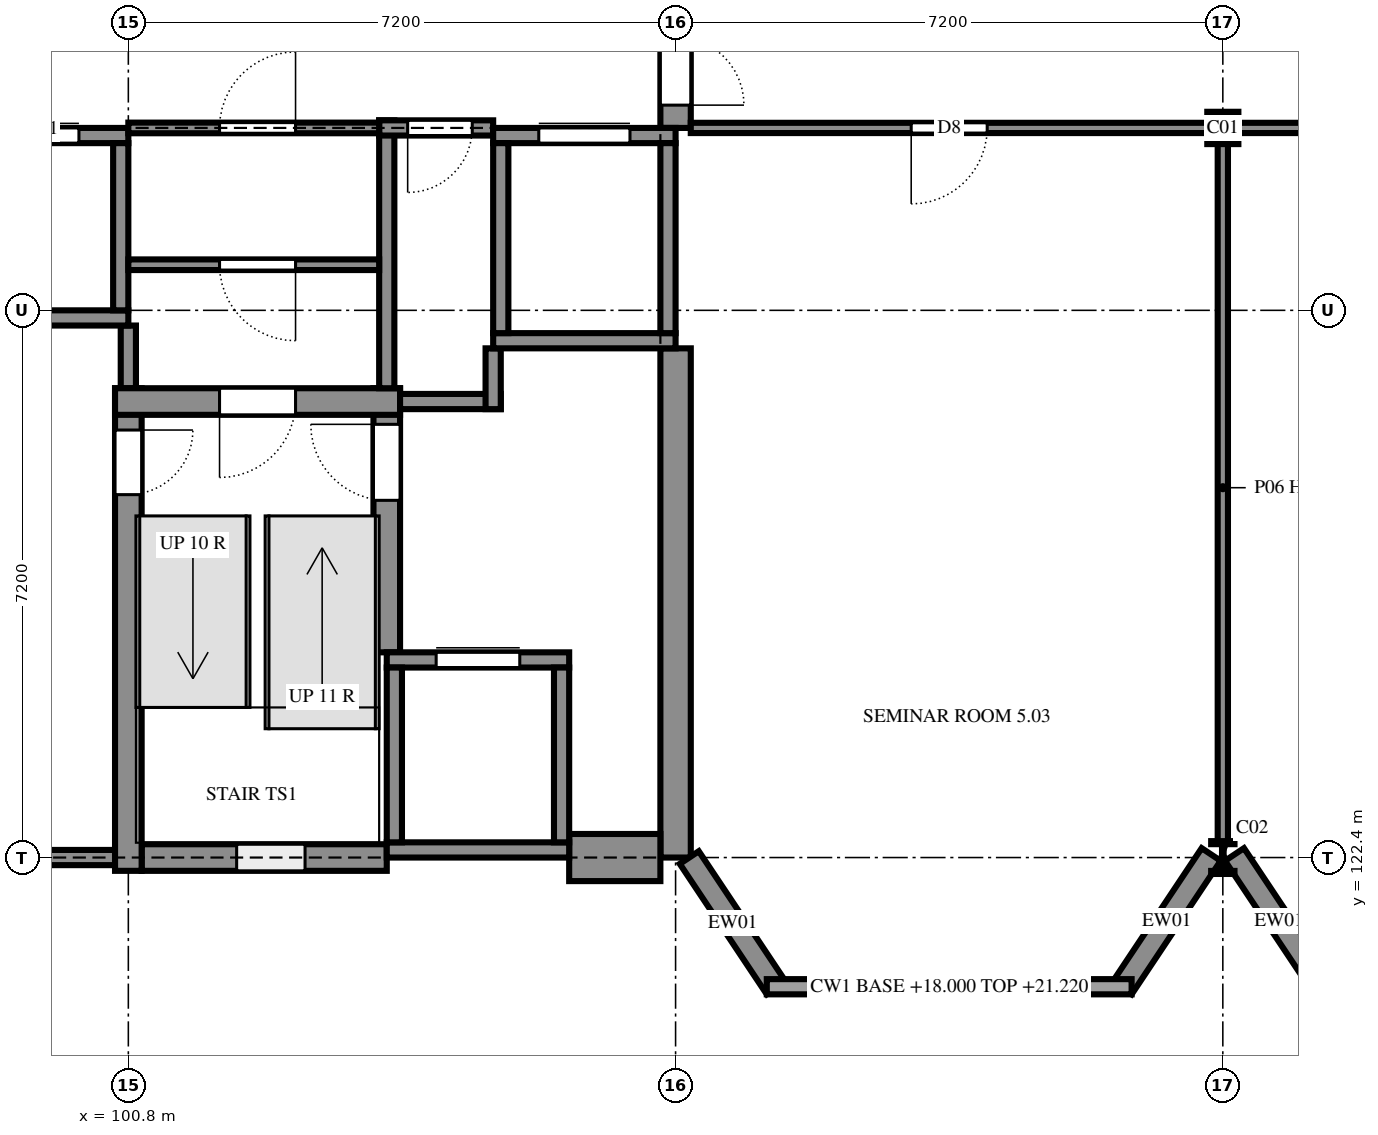
"""IFC4 building model, lengths in metres.
Left out: names, types, materials, properties, quantities, classifications, styles, units other than length and angle.
Written with IfcOpenShell. Run it as: python <this file> out.ifc"""

import sys

from ifc_helpers import new_model, si_unit, direction, frame, frame_2d, origin, origin_2d, place, context, subcontext, project, spatial, rectangle, i_section, extrude, element, fill, save


model = new_model("IFC4")
c1 = context("Model", 3, precision=1e-05, world=origin(), true_north=direction((0.0, 1.0)))
c2 = subcontext(c1, "Body", "Model", "MODEL_VIEW")
j1 = project(units=[si_unit("LENGTHUNIT", "METRE"), si_unit("PLANEANGLEUNIT", "RADIAN")], contexts=[c1])
p1 = place(None, origin())
s1 = spatial("IfcSite", under=j1, at=p1, CompositionType="ELEMENT")
p2 = place(p1, origin())
s2 = spatial("IfcBuilding", under=s1, at=p2, CompositionType="ELEMENT")
p3 = place(p2, frame((0.0, 0.0, 18.0)))
s3 = spatial("IfcBuildingStorey", under=s2, at=p3, CompositionType="ELEMENT", Elevation=18.0)
p4 = place(p3, frame((115.2, 122.4, 0.0), z_axis=(0.0, 0.0, 1.0), x_axis=(1.0, 0.0, 0.0)))
e1 = element("IfcColumn", 1, at=p4, inside=s3, PredefinedType="COLUMN", context=c2, shape_type="SweptSolid", body=[
    extrude(i_section(OverallWidth=0.307, OverallDepth=0.432, WebThickness=0.021, FlangeThickness=0.04, FilletRadius=0.027, at=origin_2d()), origin(), (0.0, 0.0, 1.0), 3.6),
])
p5 = place(p3, frame((115.2, 132.0, 0.0), z_axis=(0.0, 0.0, 1.0), x_axis=(1.0, 0.0, 0.0)))
e2 = element("IfcColumn", 2, at=p5, inside=s3, PredefinedType="COLUMN", context=c2, shape_type="SweptSolid", body=[
    extrude(i_section(OverallWidth=0.409, OverallDepth=0.425, WebThickness=0.033, FlangeThickness=0.052, FilletRadius=0.015, at=origin_2d()), origin(), (0.0, 0.0, 1.0), 3.6),
])
p6 = place(p3, frame((93.4, 122.4, 0.0), z_axis=(0.0, 0.0, 1.0), x_axis=(1.0, 0.0, 0.0)))
e3 = element("IfcWall", 3, at=p6, inside=s3, PredefinedType="SHEAR", context=c2, shape_type="SweptSolid", body=[
    extrude(rectangle(XDim=7.575, YDim=0.2, at=frame_2d((3.788, 0.0))), origin(), (0.0, 0.0, 1.0), 3.6),
])
p7 = place(p3, frame((100.975, 122.4, 0.0), z_axis=(0.0, 0.0, 1.0), x_axis=(1.0, 0.0, 0.0)))
e4 = element("IfcWall", 4, at=p7, inside=s3, PredefinedType="SHEAR", context=c2, shape_type="SweptSolid", body=[
    extrude(rectangle(XDim=3.225, YDim=0.35, at=frame_2d((1.612, 0.0))), origin(), (0.0, 0.0, 1.0), 3.6),
])
p8 = place(p7, frame((1.25, 0.0, 0.6)))
e5 = element("IfcOpeningElement", 5, at=p8, cuts=e4, PredefinedType="OPENING", context=c2, shape_type="SweptSolid", body=[
    extrude(rectangle(XDim=0.9, YDim=2.1, at=frame_2d((0.45, 1.05))), frame((0.0, 0.185, 0.0), z_axis=(0.0, -1.0, 0.0), x_axis=(1.0, 0.0, 0.0)), (0.0, 0.0, 1.0), 0.37),
])
p9 = place(p3, frame((108.0, 122.4, 0.0), z_axis=(0.0, 0.0, 1.0), x_axis=(0.0, 1.0, 0.0)))
e6 = element("IfcWall", 6, at=p9, inside=s3, PredefinedType="SHEAR", context=c2, shape_type="SweptSolid", body=[
    extrude(rectangle(XDim=6.7, YDim=0.4, at=frame_2d((3.35, 0.0))), origin(), (0.0, 0.0, 1.0), 3.6),
])
p10 = place(p3, frame((104.2, 125.1, 0.0), z_axis=(0.0, 0.0, 1.0), x_axis=(0.0, 1.0, 0.0)))
e7 = element("IfcWall", 7, at=p10, inside=s3, PredefinedType="SHEAR", context=c2, shape_type="SweptSolid", body=[
    extrude(rectangle(XDim=3.475, YDim=0.35, at=frame_2d((1.737, 0.0))), origin(), (0.0, 0.0, 1.0), 3.6),
])
p11 = place(p10, frame((2.0, 0.0, 0.0)))
e8 = element("IfcOpeningElement", 8, at=p11, cuts=e7, PredefinedType="OPENING", context=c2, shape_type="SweptSolid", body=[
    extrude(rectangle(XDim=1.0, YDim=2.1, at=frame_2d((0.5, 1.05))), frame((0.0, 0.185, 0.0), z_axis=(0.0, -1.0, 0.0), x_axis=(1.0, 0.0, 0.0)), (0.0, 0.0, 1.0), 0.37),
])
p12 = place(p3, frame((100.8, 128.575, 0.0), z_axis=(0.0, 0.0, 1.0), x_axis=(0.0, -1.0, 0.0)))
e9 = element("IfcWall", 9, at=p12, inside=s3, PredefinedType="SHEAR", context=c2, shape_type="SweptSolid", body=[
    extrude(rectangle(XDim=6.35, YDim=0.35, at=frame_2d((3.175, 0.0))), origin(), (0.0, 0.0, 1.0), 3.6),
])
p13 = place(p12, frame((0.55, 0.0, 0.0)))
e10 = element("IfcOpeningElement", 10, at=p13, cuts=e9, PredefinedType="OPENING", context=c2, shape_type="SweptSolid", body=[
    extrude(rectangle(XDim=0.85, YDim=2.1, at=frame_2d((0.425, 1.05))), frame((0.0, 0.185, 0.0), z_axis=(0.0, -1.0, 0.0), x_axis=(1.0, 0.0, 0.0)), (0.0, 0.0, 1.0), 0.37),
])
p14 = place(p3, frame((100.8, 128.575, 0.0), z_axis=(0.0, 0.0, 1.0), x_axis=(0.0, 1.0, 0.0)))
e11 = element("IfcWall", 11, at=p14, inside=s3, PredefinedType="SHEAR", context=c2, shape_type="SweptSolid", body=[
    extrude(rectangle(XDim=0.825, YDim=0.2, at=frame_2d((0.413, 0.0))), origin(), (0.0, 0.0, 1.0), 3.6),
])
p15 = place(p3, frame((104.375, 128.4, 0.0), z_axis=(0.0, 0.0, 1.0), x_axis=(-1.0, 0.0, 0.0)))
e12 = element("IfcWall", 12, at=p15, inside=s3, PredefinedType="SHEAR", context=c2, shape_type="SweptSolid", body=[
    extrude(rectangle(XDim=3.75, YDim=0.35, at=frame_2d((1.875, 0.0))), origin(), (0.0, 0.0, 1.0), 3.6),
])
p16 = place(p15, frame((1.375, 0.0, 0.0)))
e13 = element("IfcOpeningElement", 13, at=p16, cuts=e12, PredefinedType="OPENING", context=c2, shape_type="SweptSolid", body=[
    extrude(rectangle(XDim=1.0, YDim=2.1, at=frame_2d((0.5, 1.05))), frame((0.0, 0.185, 0.0), z_axis=(0.0, -1.0, 0.0), x_axis=(1.0, 0.0, 0.0)), (0.0, 0.0, 1.0), 0.37),
])
p17 = place(p3, frame((104.375, 128.4, 0.0), z_axis=(0.0, 0.0, 1.0), x_axis=(1.0, 0.0, 0.0)))
e14 = element("IfcWall", 14, at=p17, inside=s3, PredefinedType="SHEAR", context=c2, shape_type="SweptSolid", body=[
    extrude(rectangle(XDim=1.325, YDim=0.2, at=frame_2d((0.663, 0.0))), origin(), (0.0, 0.0, 1.0), 3.6),
])
p18 = place(p3, frame((105.6, 128.3, 0.0), z_axis=(0.0, 0.0, 1.0), x_axis=(0.0, 1.0, 0.0)))
e15 = element("IfcWall", 15, at=p18, inside=s3, PredefinedType="SHEAR", context=c2, shape_type="SweptSolid", body=[
    extrude(rectangle(XDim=0.8, YDim=0.2, at=frame_2d((0.4, 0.0))), origin(), (0.0, 0.0, 1.0), 3.6),
])
p19 = place(p3, frame((104.2, 132.1, 0.0), z_axis=(0.0, 0.0, 1.0), x_axis=(0.0, -1.0, 0.0)))
e16 = element("IfcWall", 16, at=p19, inside=s3, PredefinedType="SHEAR", context=c2, shape_type="SweptSolid", body=[
    extrude(rectangle(XDim=3.525, YDim=0.2, at=frame_2d((1.763, 0.0))), origin(), (0.0, 0.0, 1.0), 3.6),
])
p20 = place(p3, frame((105.6, 132.0, 0.0), z_axis=(0.0, 0.0, 1.0), x_axis=(-1.0, 0.0, 0.0)))
e17 = element("IfcWall", 17, at=p20, inside=s3, PredefinedType="SHEAR", context=c2, shape_type="SweptSolid", body=[
    extrude(rectangle(XDim=1.5, YDim=0.2, at=frame_2d((0.75, 0.0))), origin(), (0.0, 0.0, 1.0), 3.6),
])
p21 = place(p20, frame((0.275, 0.0, 0.0)))
e18 = element("IfcOpeningElement", 18, at=p21, cuts=e17, PredefinedType="OPENING", context=c2, shape_type="SweptSolid", body=[
    extrude(rectangle(XDim=0.85, YDim=2.1, at=frame_2d((0.425, 1.05))), frame((0.0, 0.11, 0.0), z_axis=(0.0, -1.0, 0.0), x_axis=(1.0, 0.0, 0.0)), (0.0, 0.0, 1.0), 0.22),
])
p22 = place(p3, frame((108.0, 132.0, 0.0), z_axis=(0.0, 0.0, 1.0), x_axis=(0.0, 1.0, 0.0)))
e19 = element("IfcWall", 19, at=p22, inside=s3, PredefinedType="SHEAR", context=c2, shape_type="SweptSolid", body=[
    extrude(rectangle(XDim=2.5, YDim=0.4, at=frame_2d((1.25, 0.0))), origin(), (0.0, 0.0, 1.0), 3.6),
])
p23 = place(p22, frame((0.3, 0.0, 0.0)))
e20 = element("IfcOpeningElement", 20, at=p23, cuts=e19, PredefinedType="OPENING", context=c2, shape_type="SweptSolid", body=[
    extrude(rectangle(XDim=1.8, YDim=2.1, at=frame_2d((0.9, 1.05))), frame((0.0, 0.21, 0.0), z_axis=(0.0, -1.0, 0.0), x_axis=(1.0, 0.0, 0.0)), (0.0, 0.0, 1.0), 0.42),
])
p24 = place(p3, frame((106.6, 122.4, 0.0), z_axis=(0.0, 0.0, 1.0), x_axis=(1.0, 0.0, 0.0)))
e21 = element("IfcWall", 21, at=p24, inside=s3, PredefinedType="SOLIDWALL", context=c2, shape_type="SweptSolid", body=[
    extrude(rectangle(XDim=1.2, YDim=0.62, at=frame_2d((0.6, 0.0))), origin(), (0.0, 0.0, 1.0), 3.46),
])
p25 = place(p3, frame((108.18, 122.4, 0.0), z_axis=(0.0, 0.0, 1.0), x_axis=(0.554618271946, -0.832104904699, 0.0)))
e22 = element("IfcWall", 22, at=p25, inside=s3, PredefinedType="SOLIDWALL", context=c2, shape_type="SweptSolid", body=[
    extrude(rectangle(XDim=2.063, YDim=0.3, at=frame_2d((1.032, 0.0))), origin(), (0.0, 0.0, 1.0), 3.22),
])
p26 = place(p3, frame((115.046, 122.44, 0.0), z_axis=(0.0, 0.0, 1.0), x_axis=(-0.554620150341, -0.8321036527, 0.0)))
e23 = element("IfcWall", 23, at=p26, inside=s3, PredefinedType="SOLIDWALL", context=c2, shape_type="SweptSolid", body=[
    extrude(rectangle(XDim=2.112, YDim=0.3, at=frame_2d((1.056, 0.0))), origin(), (0.0, 0.0, 1.0), 3.22),
])
p27 = place(p3, frame((115.354, 122.44, 0.0), z_axis=(0.0, 0.0, 1.0), x_axis=(0.554700196225, -0.832050294338, 0.0)))
e24 = element("IfcWall", 24, at=p27, inside=s3, PredefinedType="SOLIDWALL", context=c2, shape_type="SweptSolid", body=[
    extrude(rectangle(XDim=2.112, YDim=0.3, at=frame_2d((1.056, 0.0))), origin(), (0.0, 0.0, 1.0), 3.22),
])
p28 = place(p3, frame((98.4, 129.5, 0.0), z_axis=(0.0, 0.0, 1.0), x_axis=(1.0, 0.0, 0.0)))
e25 = element("IfcWall", 25, at=p28, inside=s3, PredefinedType="SHEAR", context=c2, shape_type="SweptSolid", body=[
    extrude(rectangle(XDim=2.4, YDim=0.2, at=frame_2d((1.2, 0.0))), origin(), (0.0, 0.0, 1.0), 3.6),
])
p29 = place(p3, frame((98.4, 131.9, 0.0), z_axis=(0.0, 0.0, 1.0), x_axis=(1.0, 0.0, 0.0)))
e26 = element("IfcWall", 26, at=p29, inside=s3, PredefinedType="SHEAR", context=c2, shape_type="SweptSolid", body=[
    extrude(rectangle(XDim=2.4, YDim=0.2, at=frame_2d((1.2, 0.0))), origin(), (0.0, 0.0, 1.0), 3.6),
])
p30 = place(p29, frame((0.65, 0.0, 0.0)))
e27 = element("IfcOpeningElement", 27, at=p30, cuts=e26, PredefinedType="OPENING", context=c2, shape_type="SweptSolid", body=[
    extrude(rectangle(XDim=1.1, YDim=2.1, at=frame_2d((0.55, 1.05))), frame((0.0, 0.11, 0.0), z_axis=(0.0, -1.0, 0.0), x_axis=(1.0, 0.0, 0.0)), (0.0, 0.0, 1.0), 0.22),
])
p31 = place(p3, frame((100.7, 129.6, 0.0), z_axis=(0.0, 0.0, 1.0), x_axis=(0.0, 1.0, 0.0)))
e28 = element("IfcWall", 28, at=p31, inside=s3, PredefinedType="SHEAR", context=c2, shape_type="SweptSolid", body=[
    extrude(rectangle(XDim=2.2, YDim=0.2, at=frame_2d((1.1, 0.0))), origin(), (0.0, 0.0, 1.0), 3.6),
])
p32 = place(p3, frame((104.2, 122.5, 0.0), z_axis=(0.0, 0.0, 1.0), x_axis=(1.0, 0.0, 0.0)))
e29 = element("IfcWall", 29, at=p32, inside=s3, PredefinedType="SHEAR", context=c2, shape_type="SweptSolid", body=[
    extrude(rectangle(XDim=2.4, YDim=0.2, at=frame_2d((1.2, 0.0))), origin(), (0.0, 0.0, 1.0), 3.6),
])
p33 = place(p3, frame((104.2, 125.0, 0.0), z_axis=(0.0, 0.0, 1.0), x_axis=(1.0, 0.0, 0.0)))
e30 = element("IfcWall", 30, at=p33, inside=s3, PredefinedType="SHEAR", context=c2, shape_type="SweptSolid", body=[
    extrude(rectangle(XDim=2.4, YDim=0.2, at=frame_2d((1.2, 0.0))), origin(), (0.0, 0.0, 1.0), 3.6),
])
p34 = place(p33, frame((0.65, 0.0, 0.0)))
e31 = element("IfcOpeningElement", 31, at=p34, cuts=e30, PredefinedType="OPENING", context=c2, shape_type="SweptSolid", body=[
    extrude(rectangle(XDim=1.1, YDim=2.1, at=frame_2d((0.55, 1.05))), frame((0.0, 0.11, 0.0), z_axis=(0.0, -1.0, 0.0), x_axis=(1.0, 0.0, 0.0)), (0.0, 0.0, 1.0), 0.22),
])
for number, where, z_axis, x_axis in (
    (32, (104.3, 122.6, 0.0), (0.0, 0.0, 1.0), (0.0, 1.0, 0.0)),
    (33, (106.5, 122.6, 0.0), (0.0, 0.0, 1.0), (0.0, 1.0, 0.0)),
):
    element("IfcWall", number, at=place(p3, frame(where, z_axis=z_axis, x_axis=x_axis)), inside=s3, PredefinedType="SHEAR", context=c2, shape_type="SweptSolid", body=[
        extrude(rectangle(XDim=2.3, YDim=0.2, at=frame_2d((1.15, 0.0))), origin(), (0.0, 0.0, 1.0), 3.6),
    ])
p35 = place(p3, frame((105.6, 129.2, 0.0), z_axis=(0.0, 0.0, 1.0), x_axis=(1.0, 0.0, 0.0)))
e34 = element("IfcWall", 34, at=p35, inside=s3, PredefinedType="SHEAR", context=c2, shape_type="SweptSolid", body=[
    extrude(rectangle(XDim=2.4, YDim=0.2, at=frame_2d((1.2, 0.0))), origin(), (0.0, 0.0, 1.0), 3.6),
])
p36 = place(p3, frame((105.6, 131.9, 0.0), z_axis=(0.0, 0.0, 1.0), x_axis=(1.0, 0.0, 0.0)))
e35 = element("IfcWall", 35, at=p36, inside=s3, PredefinedType="SHEAR", context=c2, shape_type="SweptSolid", body=[
    extrude(rectangle(XDim=2.4, YDim=0.2, at=frame_2d((1.2, 0.0))), origin(), (0.0, 0.0, 1.0), 3.6),
])
p37 = place(p36, frame((0.6, 0.0, 0.0)))
e36 = element("IfcOpeningElement", 36, at=p37, cuts=e35, PredefinedType="OPENING", context=c2, shape_type="SweptSolid", body=[
    extrude(rectangle(XDim=1.2, YDim=2.1, at=frame_2d((0.6, 1.05))), frame((0.0, 0.11, 0.0), z_axis=(0.0, -1.0, 0.0), x_axis=(1.0, 0.0, 0.0)), (0.0, 0.0, 1.0), 0.22),
])
for number, where, z_axis, x_axis in (
    (37, (105.7, 129.3, 0.0), (0.0, 0.0, 1.0), (0.0, 1.0, 0.0)),
    (38, (107.9, 129.3, 0.0), (0.0, 0.0, 1.0), (0.0, 1.0, 0.0)),
):
    element("IfcWall", number, at=place(p3, frame(where, z_axis=z_axis, x_axis=x_axis)), inside=s3, PredefinedType="SHEAR", context=c2, shape_type="SweptSolid", body=[
        extrude(rectangle(XDim=2.5, YDim=0.2, at=frame_2d((1.25, 0.0))), origin(), (0.0, 0.0, 1.0), 3.6),
    ])
p38 = place(p3, frame((100.8, 130.2, 0.0), z_axis=(0.0, 0.0, 1.0), x_axis=(1.0, 0.0, 0.0)))
e39 = element("IfcWall", 39, at=p38, inside=s3, PredefinedType="PARTITIONING", context=c2, shape_type="SweptSolid", body=[
    extrude(rectangle(XDim=3.3, YDim=0.14, at=frame_2d((1.65, 0.0))), origin(), (0.0, 0.0, 1.0), 3.46),
])
p39 = place(p38, frame((1.2, 0.0, 0.0)))
e40 = element("IfcOpeningElement", 40, at=p39, cuts=e39, PredefinedType="OPENING", context=c2, shape_type="SweptSolid", body=[
    extrude(rectangle(XDim=1.0, YDim=2.1, at=frame_2d((0.5, 1.05))), frame((0.0, 0.08, 0.0), z_axis=(0.0, -1.0, 0.0), x_axis=(1.0, 0.0, 0.0)), (0.0, 0.0, 1.0), 0.16),
])
p40 = place(p3, frame((100.8, 132.0, 0.0), z_axis=(0.0, 0.0, 1.0), x_axis=(1.0, 0.0, 0.0)))
e41 = element("IfcWall", 41, at=p40, inside=s3, PredefinedType="PARTITIONING", context=c2, shape_type="SweptSolid", body=[
    extrude(rectangle(XDim=3.3, YDim=0.14, at=frame_2d((1.65, 0.0))), origin(), (0.0, 0.0, 1.0), 3.46),
])
p41 = place(p40, frame((1.2, 0.0, 0.0)))
e42 = element("IfcOpeningElement", 42, at=p41, cuts=e41, PredefinedType="OPENING", context=c2, shape_type="SweptSolid", body=[
    extrude(rectangle(XDim=1.0, YDim=2.1, at=frame_2d((0.5, 1.05))), frame((0.0, 0.08, 0.0), z_axis=(0.0, -1.0, 0.0), x_axis=(1.0, 0.0, 0.0)), (0.0, 0.0, 1.0), 0.16),
])
p42 = place(p3, frame((108.2, 132.0, 0.0), z_axis=(0.0, 0.0, 1.0), x_axis=(1.0, 0.0, 0.0)))
e43 = element("IfcWall", 43, at=p42, inside=s3, PredefinedType="PARTITIONING", context=c2, shape_type="SweptSolid", body=[
    extrude(rectangle(XDim=19.258, YDim=0.135, at=frame_2d((9.629, 0.0))), origin(), (0.0, 0.0, 1.0), 3.16),
])
p43 = place(p42, frame((2.9, 0.0, 0.0)))
e44 = element("IfcOpeningElement", 44, at=p43, cuts=e43, PredefinedType="OPENING", context=c2, shape_type="SweptSolid", body=[
    extrude(rectangle(XDim=1.0, YDim=2.4, at=frame_2d((0.5, 1.2))), frame((0.0, 0.077, 0.0), z_axis=(0.0, -1.0, 0.0), x_axis=(1.0, 0.0, 0.0)), (0.0, 0.0, 1.0), 0.155),
])
p44 = place(p42, frame((10.1, 0.0, 0.0)))
e45 = element("IfcOpeningElement", 45, at=p44, cuts=e43, PredefinedType="OPENING", context=c2, shape_type="SweptSolid", body=[
    extrude(rectangle(XDim=1.0, YDim=2.4, at=frame_2d((0.5, 1.2))), frame((0.0, 0.077, 0.0), z_axis=(0.0, -1.0, 0.0), x_axis=(1.0, 0.0, 0.0)), (0.0, 0.0, 1.0), 0.155),
])
p45 = place(p42, frame((18.1, 0.0, 0.0)))
e46 = element("IfcOpeningElement", 46, at=p45, cuts=e43, PredefinedType="OPENING", context=c2, shape_type="SweptSolid", body=[
    extrude(rectangle(XDim=1.0, YDim=2.4, at=frame_2d((0.5, 1.2))), frame((0.0, 0.077, 0.0), z_axis=(0.0, -1.0, 0.0), x_axis=(1.0, 0.0, 0.0)), (0.0, 0.0, 1.0), 0.155),
])
p46 = place(p3, frame((115.2, 122.6, 0.0), z_axis=(0.0, 0.0, 1.0), x_axis=(0.0, 1.0, 0.0)))
e47 = element("IfcWall", 47, at=p46, inside=s3, PredefinedType="PARTITIONING", context=c2, shape_type="SweptSolid", body=[
    extrude(rectangle(XDim=9.333, YDim=0.135, at=frame_2d((4.666, 0.0))), origin(), (0.0, 0.0, 1.0), 3.06),
])
p47 = place(p8, origin())
e48 = element("IfcWindow", 48, at=p47, inside=s3, PartitioningType="SINGLE_PANEL", PredefinedType="WINDOW", context=c2, shape_type="SweptSolid", body=[
    extrude(rectangle(XDim=0.9, YDim=2.1, at=frame_2d((0.45, 1.05))), frame((0.0, 0.03, 0.0), z_axis=(0.0, -1.0, 0.0), x_axis=(1.0, 0.0, 0.0)), (0.0, 0.0, 1.0), 0.06),
])
fill(e5, e48)
p48 = place(p30, origin())
e49 = element("IfcDoor", 49, at=p48, inside=s3, OperationType="SLIDING_TO_LEFT", PredefinedType="DOOR", context=c2, shape_type="SweptSolid", body=[
    extrude(rectangle(XDim=1.1, YDim=2.1, at=frame_2d((0.55, 1.05))), frame((0.0, 0.025, 0.0), z_axis=(0.0, -1.0, 0.0), x_axis=(1.0, 0.0, 0.0)), (0.0, 0.0, 1.0), 0.05),
])
fill(e27, e49)
p49 = place(p34, origin())
e50 = element("IfcDoor", 50, at=p49, inside=s3, OperationType="SLIDING_TO_LEFT", PredefinedType="DOOR", context=c2, shape_type="SweptSolid", body=[
    extrude(rectangle(XDim=1.1, YDim=2.1, at=frame_2d((0.55, 1.05))), frame((0.0, 0.025, 0.0), z_axis=(0.0, -1.0, 0.0), x_axis=(1.0, 0.0, 0.0)), (0.0, 0.0, 1.0), 0.05),
])
fill(e31, e50)
p50 = place(p37, origin())
e51 = element("IfcDoor", 51, at=p50, inside=s3, OperationType="SLIDING_TO_LEFT", PredefinedType="DOOR", context=c2, shape_type="SweptSolid", body=[
    extrude(rectangle(XDim=1.2, YDim=2.1, at=frame_2d((0.6, 1.05))), frame((0.0, 0.025, 0.0), z_axis=(0.0, -1.0, 0.0), x_axis=(1.0, 0.0, 0.0)), (0.0, 0.0, 1.0), 0.05),
])
fill(e36, e51)
p51 = place(p39, frame((1.0, 0.0, 0.0), z_axis=(0.0, 0.0, 1.0), x_axis=(-1.0, 0.0, 0.0)))
e52 = element("IfcDoor", 52, at=p51, inside=s3, OperationType="SINGLE_SWING_RIGHT", PredefinedType="DOOR", context=c2, shape_type="SweptSolid", body=[
    extrude(rectangle(XDim=1.0, YDim=2.1, at=frame_2d((0.5, 1.05))), frame((0.0, 0.025, 0.0), z_axis=(0.0, -1.0, 0.0), x_axis=(1.0, 0.0, 0.0)), (0.0, 0.0, 1.0), 0.05),
])
fill(e40, e52)
p52 = place(p41, origin())
e53 = element("IfcDoor", 53, at=p52, inside=s3, OperationType="SINGLE_SWING_LEFT", PredefinedType="DOOR", context=c2, shape_type="SweptSolid", body=[
    extrude(rectangle(XDim=1.0, YDim=2.1, at=frame_2d((0.5, 1.05))), frame((0.0, 0.025, 0.0), z_axis=(0.0, -1.0, 0.0), x_axis=(1.0, 0.0, 0.0)), (0.0, 0.0, 1.0), 0.05),
])
fill(e42, e53)
p53 = place(p43, frame((1.0, 0.0, 0.0), z_axis=(0.0, 0.0, 1.0), x_axis=(-1.0, 0.0, 0.0)))
e54 = element("IfcDoor", 54, at=p53, inside=s3, OperationType="SINGLE_SWING_LEFT", PredefinedType="DOOR", context=c2, shape_type="SweptSolid", body=[
    extrude(rectangle(XDim=1.0, YDim=2.4, at=frame_2d((0.5, 1.2))), frame((0.0, 0.025, 0.0), z_axis=(0.0, -1.0, 0.0), x_axis=(1.0, 0.0, 0.0)), (0.0, 0.0, 1.0), 0.05),
])
fill(e44, e54)
p54 = place(p16, origin())
e55 = element("IfcDoor", 55, at=p54, inside=s3, OperationType="SINGLE_SWING_LEFT", PredefinedType="DOOR", context=c2, shape_type="SweptSolid", body=[
    extrude(rectangle(XDim=1.0, YDim=2.1, at=frame_2d((0.5, 1.05))), frame((0.0, 0.025, 0.0), z_axis=(0.0, -1.0, 0.0), x_axis=(1.0, 0.0, 0.0)), (0.0, 0.0, 1.0), 0.05),
])
fill(e13, e55)
p55 = place(p13, origin())
e56 = element("IfcDoor", 56, at=p55, inside=s3, OperationType="SINGLE_SWING_RIGHT", PredefinedType="DOOR", context=c2, shape_type="SweptSolid", body=[
    extrude(rectangle(XDim=0.85, YDim=2.1, at=frame_2d((0.425, 1.05))), frame((0.0, 0.025, 0.0), z_axis=(0.0, -1.0, 0.0), x_axis=(1.0, 0.0, 0.0)), (0.0, 0.0, 1.0), 0.05),
])
fill(e10, e56)
p56 = place(p11, origin())
e57 = element("IfcDoor", 57, at=p56, inside=s3, OperationType="SINGLE_SWING_LEFT", PredefinedType="DOOR", context=c2, shape_type="SweptSolid", body=[
    extrude(rectangle(XDim=1.0, YDim=2.1, at=frame_2d((0.5, 1.05))), frame((0.0, 0.025, 0.0), z_axis=(0.0, -1.0, 0.0), x_axis=(1.0, 0.0, 0.0)), (0.0, 0.0, 1.0), 0.05),
])
fill(e8, e57)
p57 = place(p21, origin())
e58 = element("IfcDoor", 58, at=p57, inside=s3, OperationType="SINGLE_SWING_LEFT", PredefinedType="DOOR", context=c2, shape_type="SweptSolid", body=[
    extrude(rectangle(XDim=0.85, YDim=2.1, at=frame_2d((0.425, 1.05))), frame((0.0, 0.025, 0.0), z_axis=(0.0, -1.0, 0.0), x_axis=(1.0, 0.0, 0.0)), (0.0, 0.0, 1.0), 0.05),
])
fill(e18, e58)
p58 = place(p23, frame((1.8, 0.0, 0.0), z_axis=(0.0, 0.0, 1.0), x_axis=(-1.0, 0.0, 0.0)))
e59 = element("IfcDoor", 59, at=p58, inside=s3, OperationType="DOUBLE_DOOR_SINGLE_SWING", PredefinedType="DOOR", context=c2, shape_type="SweptSolid", body=[
    extrude(rectangle(XDim=1.8, YDim=2.1, at=frame_2d((0.9, 1.05))), frame((0.0, 0.025, 0.0), z_axis=(0.0, -1.0, 0.0), x_axis=(1.0, 0.0, 0.0)), (0.0, 0.0, 1.0), 0.05),
])
fill(e20, e59)
save(model, sys.argv[1])
